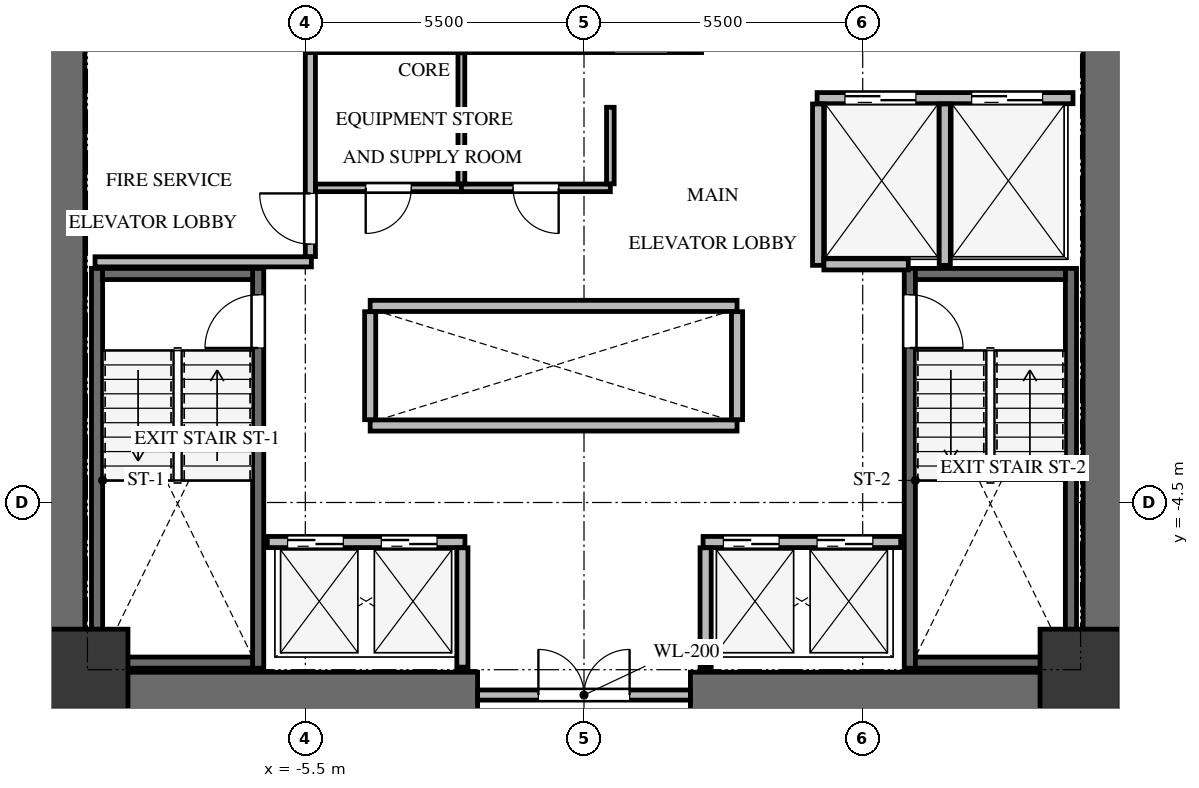
"""IFC4 building model, lengths in metres.
Left out: names, types, materials, properties, quantities, classifications, styles, units other than length and angle.
Written with IfcOpenShell. Run it as: python <this file> out.ifc"""

import sys

from ifc_helpers import new_model, si_unit, direction, frame, frame_2d, origin, origin_2d, place, context, subcontext, project, spatial, rectangle, extrude, source, transform, mapped, element, fill, save


model = new_model("IFC4")
c1 = context("Model", 3, precision=1e-05, world=origin(), true_north=direction((0.0, 1.0)))
c2 = subcontext(c1, "Body", "Model", "MODEL_VIEW")
j1 = project(units=[si_unit("LENGTHUNIT", "METRE"), si_unit("PLANEANGLEUNIT", "RADIAN")], contexts=[c1])
p1 = place(None, origin())
s1 = spatial("IfcSite", under=j1, at=p1, CompositionType="ELEMENT")
p2 = place(p1, origin())
s2 = spatial("IfcBuilding", under=s1, at=p2, CompositionType="ELEMENT")
p3 = place(p2, frame((0.0, 0.0, 62.1)))
s3 = spatial("IfcBuildingStorey", under=s2, at=p3, CompositionType="ELEMENT", Elevation=62.1)
for number, where, z_axis, x_axis in (
    (1, (-10.3, -8.75, 0.0), (0.0, 0.0, 1.0), (0.0, 1.0, 0.0)),
    (2, (10.3, -8.75, 0.0), (0.0, 0.0, 1.0), (0.0, 1.0, 0.0)),
):
    element("IfcWall", number, at=place(p3, frame(where, z_axis=z_axis, x_axis=x_axis)), inside=s3, PredefinedType="SHEAR", context=c2, shape_type="SweptSolid", body=[
        extrude(rectangle(XDim=17.5, YDim=0.9, at=frame_2d((8.75, 0.0))), origin(), (0.0, 0.0, 1.0), 3.3),
    ])
for number, where, z_axis, x_axis in (
    (3, (-9.85, -8.3, 0.0), (0.0, 0.0, 1.0), (1.0, 0.0, 0.0)),
    (4, (2.1, -8.3, 0.0), (0.0, 0.0, 1.0), (1.0, 0.0, 0.0)),
):
    element("IfcWall", number, at=place(p3, frame(where, z_axis=z_axis, x_axis=x_axis)), inside=s3, PredefinedType="SHEAR", context=c2, shape_type="SweptSolid", body=[
        extrude(rectangle(XDim=7.75, YDim=0.9, at=frame_2d((3.875, 0.0))), origin(), (0.0, 0.0, 1.0), 3.3),
    ])
p4 = place(p3, frame((-6.43, -7.77, -0.24), z_axis=(0.0, 0.0, 1.0), x_axis=(0.0, 1.0, 0.0)))
e5 = element("IfcWall", 5, at=p4, inside=s3, PredefinedType="SHEAR", context=c2, shape_type="SweptSolid", body=[
    extrude(rectangle(XDim=7.89, YDim=0.22, at=frame_2d((3.945, 0.0))), origin(), (0.0, 0.0, 1.0), 3.3),
])
p5 = place(p4, frame((6.32, 0.0, 0.0)))
e6 = element("IfcOpeningElement", 6, at=p5, cuts=e5, PredefinedType="OPENING", context=c2, shape_type="SweptSolid", body=[
    extrude(rectangle(XDim=1.05, YDim=2.15, at=frame_2d((0.525, 1.075))), frame((0.0, 0.12, 0.0), z_axis=(0.0, -1.0, 0.0), x_axis=(1.0, 0.0, 0.0)), (0.0, 0.0, 1.0), 0.24),
])
p6 = place(p3, frame((-9.61, 0.12, -0.24), z_axis=(0.0, 0.0, 1.0), x_axis=(0.0, -1.0, 0.0)))
e7 = element("IfcWall", 7, at=p6, inside=s3, PredefinedType="SHEAR", context=c2, shape_type="SweptSolid", body=[
    extrude(rectangle(XDim=7.89, YDim=0.22, at=frame_2d((3.945, 0.0))), origin(), (0.0, 0.0, 1.0), 3.3),
])
for number, where, z_axis, x_axis in (
    (8, (-9.5, -7.66, -0.24), (0.0, 0.0, 1.0), (1.0, 0.0, 0.0)),
    (9, (-6.54, 0.01, -0.24), (0.0, 0.0, 1.0), (-1.0, 0.0, 0.0)),
):
    element("IfcWall", number, at=place(p3, frame(where, z_axis=z_axis, x_axis=x_axis)), inside=s3, PredefinedType="SHEAR", context=c2, shape_type="SweptSolid", body=[
        extrude(rectangle(XDim=2.96, YDim=0.22, at=frame_2d((1.48, 0.0))), origin(), (0.0, 0.0, 1.0), 3.3),
    ])
p7 = place(p3, frame((9.61, -7.77, -0.24), z_axis=(0.0, 0.0, 1.0), x_axis=(0.0, 1.0, 0.0)))
e10 = element("IfcWall", 10, at=p7, inside=s3, PredefinedType="SHEAR", context=c2, shape_type="SweptSolid", body=[
    extrude(rectangle(XDim=7.89, YDim=0.22, at=frame_2d((3.945, 0.0))), origin(), (0.0, 0.0, 1.0), 3.3),
])
p8 = place(p3, frame((6.43, 0.12, -0.24), z_axis=(0.0, 0.0, 1.0), x_axis=(0.0, -1.0, 0.0)))
e11 = element("IfcWall", 11, at=p8, inside=s3, PredefinedType="SHEAR", context=c2, shape_type="SweptSolid", body=[
    extrude(rectangle(XDim=7.89, YDim=0.22, at=frame_2d((3.945, 0.0))), origin(), (0.0, 0.0, 1.0), 3.3),
])
p9 = place(p8, frame((0.52, 0.0, 0.0)))
e12 = element("IfcOpeningElement", 12, at=p9, cuts=e11, PredefinedType="OPENING", context=c2, shape_type="SweptSolid", body=[
    extrude(rectangle(XDim=1.05, YDim=2.15, at=frame_2d((0.525, 1.075))), frame((0.0, 0.12, 0.0), z_axis=(0.0, -1.0, 0.0), x_axis=(1.0, 0.0, 0.0)), (0.0, 0.0, 1.0), 0.24),
])
for number, where, z_axis, x_axis in (
    (13, (6.54, -7.66, -0.24), (0.0, 0.0, 1.0), (1.0, 0.0, 0.0)),
    (14, (9.5, 0.01, -0.24), (0.0, 0.0, 1.0), (-1.0, 0.0, 0.0)),
):
    element("IfcWall", number, at=place(p3, frame(where, z_axis=z_axis, x_axis=x_axis)), inside=s3, PredefinedType="SHEAR", context=c2, shape_type="SweptSolid", body=[
        extrude(rectangle(XDim=2.96, YDim=0.22, at=frame_2d((1.48, 0.0))), origin(), (0.0, 0.0, 1.0), 3.3),
    ])
for number, where, z_axis, x_axis in (
    (15, (2.21, 4.38, -0.24), (0.0, 0.0, 1.0), (0.0, 1.0, 0.0)),
    (16, (-5.36, 7.78, -0.24), (0.0, 0.0, 1.0), (0.0, -1.0, 0.0)),
):
    element("IfcWall", number, at=place(p3, frame(where, z_axis=z_axis, x_axis=x_axis)), inside=s3, PredefinedType="SHEAR", context=c2, shape_type="SweptSolid", body=[
        extrude(rectangle(XDim=3.4, YDim=0.22, at=frame_2d((1.7, 0.0))), origin(), (0.0, 0.0, 1.0), 3.3),
    ])
p10 = place(p3, frame((-5.25, 4.49, -0.24), z_axis=(0.0, 0.0, 1.0), x_axis=(1.0, 0.0, 0.0)))
e17 = element("IfcWall", 17, at=p10, inside=s3, PredefinedType="SHEAR", context=c2, shape_type="SweptSolid", body=[
    extrude(rectangle(XDim=7.35, YDim=0.22, at=frame_2d((3.675, 0.0))), origin(), (0.0, 0.0, 1.0), 3.3),
])
p11 = place(p10, frame((5.85, 0.0, 0.0)))
e18 = element("IfcOpeningElement", 18, at=p11, cuts=e17, PredefinedType="OPENING", context=c2, shape_type="SweptSolid", body=[
    extrude(rectangle(XDim=1.05, YDim=2.15, at=frame_2d((0.525, 1.075))), frame((0.0, 0.12, 0.0), z_axis=(0.0, -1.0, 0.0), x_axis=(1.0, 0.0, 0.0)), (0.0, 0.0, 1.0), 0.24),
])
m1 = source(origin(), c2, "Body", "SweptSolid", [
    extrude(rectangle(XDim=1.6, YDim=1.6, at=origin_2d()), origin(), (0.0, 0.0, 1.0), 3.3),
])
for number, where, z_axis, x_axis in (
    (19, (-9.8, -7.8, -0.24), (0.0, 0.0, 1.0), (1.0, 0.0, 0.0)),
    (20, (9.8, -7.8, -0.24), (0.0, 0.0, 1.0), (1.0, 0.0, 0.0)),
):
    element("IfcColumn", number, at=place(p3, frame(where, z_axis=z_axis, x_axis=x_axis)), inside=s3, PredefinedType="COLUMN", context=c2, shape_type="MappedRepresentation", body=[
        mapped(m1, transform((0.0, 0.0, 0.0), x_axis=(1.0, 0.0, 0.0), y_axis=(0.0, 1.0, 0.0), z_axis=(0.0, 0.0, 1.0), scale=1.0)),
    ])
p12 = place(p3, frame((-2.1, -8.3, 0.0), z_axis=(0.0, 0.0, 1.0), x_axis=(1.0, 0.0, 0.0)))
e21 = element("IfcWall", 21, at=p12, inside=s3, PredefinedType="SOLIDWALL", context=c2, shape_type="SweptSolid", body=[
    extrude(rectangle(XDim=4.2, YDim=0.2, at=frame_2d((2.1, 0.0))), origin(), (0.0, 0.0, 1.0), 3.045),
])
p13 = place(p12, frame((1.2, 0.0, 0.0)))
e22 = element("IfcOpeningElement", 22, at=p13, cuts=e21, PredefinedType="OPENING", context=c2, shape_type="SweptSolid", body=[
    extrude(rectangle(XDim=1.8, YDim=2.15, at=frame_2d((0.9, 1.075))), frame((0.0, 0.11, 0.0), z_axis=(0.0, -1.0, 0.0), x_axis=(1.0, 0.0, 0.0)), (0.0, 0.0, 1.0), 0.22),
])
p14 = place(p3, frame((-9.65, 0.25, 0.0), z_axis=(0.0, 0.0, 1.0), x_axis=(1.0, 0.0, 0.0)))
e23 = element("IfcWall", 23, at=p14, inside=s3, PredefinedType="SOLIDWALL", context=c2, shape_type="SweptSolid", body=[
    extrude(rectangle(XDim=4.27, YDim=0.2, at=frame_2d((2.135, 0.0))), origin(), (0.0, 0.0, 1.0), 3.045),
])
p15 = place(p3, frame((-5.4, 0.354, 0.0), z_axis=(0.0, 0.0, 1.0), x_axis=(0.0, 1.0, 0.0)))
e24 = element("IfcWall", 24, at=p15, inside=s3, PredefinedType="SOLIDWALL", context=c2, shape_type="SweptSolid", body=[
    extrude(rectangle(XDim=4.026, YDim=0.2, at=frame_2d((2.013, 0.0))), origin(), (0.0, 0.0, 1.0), 3.045),
])
p16 = place(p15, frame((0.246, 0.0, 0.0)))
e25 = element("IfcOpeningElement", 25, at=p16, cuts=e24, PredefinedType="OPENING", context=c2, shape_type="SweptSolid", body=[
    extrude(rectangle(XDim=1.0, YDim=2.15, at=frame_2d((0.5, 1.075))), frame((0.0, 0.11, 0.0), z_axis=(0.0, -1.0, 0.0), x_axis=(1.0, 0.0, 0.0)), (0.0, 0.0, 1.0), 0.22),
])
p17 = place(p3, frame((4.6, 3.48, 0.0), z_axis=(0.0, 0.0, 1.0), x_axis=(1.0, 0.0, 0.0)))
e26 = element("IfcWall", 26, at=p17, inside=s3, PredefinedType="SOLIDWALL", context=c2, shape_type="SweptSolid", body=[
    extrude(rectangle(XDim=5.05, YDim=0.22, at=frame_2d((2.525, 0.0))), origin(), (0.0, 0.0, 1.0), 3.045),
])
p18 = place(p17, frame((0.55, 0.0, 0.0)))
e27 = element("IfcOpeningElement", 27, at=p18, cuts=e26, PredefinedType="OPENING", context=c2, shape_type="SweptSolid", body=[
    extrude(rectangle(XDim=1.4, YDim=2.15, at=frame_2d((0.7, 1.075))), frame((0.0, 0.12, 0.0), z_axis=(0.0, -1.0, 0.0), x_axis=(1.0, 0.0, 0.0)), (0.0, 0.0, 1.0), 0.24),
])
p19 = place(p17, frame((3.05, 0.0, 0.0)))
e28 = element("IfcOpeningElement", 28, at=p19, cuts=e26, PredefinedType="OPENING", context=c2, shape_type="SweptSolid", body=[
    extrude(rectangle(XDim=1.4, YDim=2.15, at=frame_2d((0.7, 1.075))), frame((0.0, 0.12, 0.0), z_axis=(0.0, -1.0, 0.0), x_axis=(1.0, 0.0, 0.0)), (0.0, 0.0, 1.0), 0.24),
])
for number, where, z_axis, x_axis in (
    (29, (4.62, 0.18, 0.0), (0.0, 0.0, 1.0), (0.0, 1.0, 0.0)),
    (30, (7.12, 0.18, 0.0), (0.0, 0.0, 1.0), (0.0, 1.0, 0.0)),
):
    element("IfcWall", number, at=place(p3, frame(where, z_axis=z_axis, x_axis=x_axis)), inside=s3, PredefinedType="SOLIDWALL", context=c2, shape_type="SweptSolid", body=[
        extrude(rectangle(XDim=3.186, YDim=0.22, at=frame_2d((1.593, 0.0))), origin(), (0.0, 0.0, 1.0), 3.045),
    ])
p20 = place(p3, frame((4.734, 0.2, 0.0), z_axis=(0.0, 0.0, 1.0), x_axis=(1.0, 0.0, 0.0)))
e31 = element("IfcWall", 31, at=p20, inside=s3, PredefinedType="SOLIDWALL", context=c2, shape_type="SweptSolid", body=[
    extrude(rectangle(XDim=1.666, YDim=0.22, at=frame_2d((0.833, 0.0))), origin(), (0.0, 0.0, 1.0), 3.045),
])
p21 = place(p3, frame((-6.25, -5.28, 0.0), z_axis=(0.0, 0.0, 1.0), x_axis=(1.0, 0.0, 0.0)))
e32 = element("IfcWall", 32, at=p21, inside=s3, PredefinedType="SOLIDWALL", context=c2, shape_type="SweptSolid", body=[
    extrude(rectangle(XDim=3.9, YDim=0.22, at=frame_2d((1.95, 0.0))), origin(), (0.0, 0.0, 1.0), 3.045),
])
p22 = place(p21, frame((0.4, 0.0, 0.0)))
e33 = element("IfcOpeningElement", 33, at=p22, cuts=e32, PredefinedType="OPENING", context=c2, shape_type="SweptSolid", body=[
    extrude(rectangle(XDim=1.1, YDim=2.15, at=frame_2d((0.55, 1.075))), frame((0.0, 0.12, 0.0), z_axis=(0.0, -1.0, 0.0), x_axis=(1.0, 0.0, 0.0)), (0.0, 0.0, 1.0), 0.24),
])
p23 = place(p21, frame((2.25, 0.0, 0.0)))
e34 = element("IfcOpeningElement", 34, at=p23, cuts=e32, PredefinedType="OPENING", context=c2, shape_type="SweptSolid", body=[
    extrude(rectangle(XDim=1.1, YDim=2.15, at=frame_2d((0.55, 1.075))), frame((0.0, 0.12, 0.0), z_axis=(0.0, -1.0, 0.0), x_axis=(1.0, 0.0, 0.0)), (0.0, 0.0, 1.0), 0.24),
])
p24 = place(p3, frame((2.35, -5.28, 0.0), z_axis=(0.0, 0.0, 1.0), x_axis=(1.0, 0.0, 0.0)))
e35 = element("IfcWall", 35, at=p24, inside=s3, PredefinedType="SOLIDWALL", context=c2, shape_type="SweptSolid", body=[
    extrude(rectangle(XDim=3.9, YDim=0.22, at=frame_2d((1.95, 0.0))), origin(), (0.0, 0.0, 1.0), 3.045),
])
p25 = place(p24, frame((0.4, 0.0, 0.0)))
e36 = element("IfcOpeningElement", 36, at=p25, cuts=e35, PredefinedType="OPENING", context=c2, shape_type="SweptSolid", body=[
    extrude(rectangle(XDim=1.1, YDim=2.15, at=frame_2d((0.55, 1.075))), frame((0.0, 0.12, 0.0), z_axis=(0.0, -1.0, 0.0), x_axis=(1.0, 0.0, 0.0)), (0.0, 0.0, 1.0), 0.24),
])
p26 = place(p24, frame((2.25, 0.0, 0.0)))
e37 = element("IfcOpeningElement", 37, at=p26, cuts=e35, PredefinedType="OPENING", context=c2, shape_type="SweptSolid", body=[
    extrude(rectangle(XDim=1.1, YDim=2.15, at=frame_2d((0.55, 1.075))), frame((0.0, 0.12, 0.0), z_axis=(0.0, -1.0, 0.0), x_axis=(1.0, 0.0, 0.0)), (0.0, 0.0, 1.0), 0.24),
])
for number, where, z_axis, x_axis in (
    (38, (-2.4, -7.75, 0.0), (0.0, 0.0, 1.0), (0.0, 1.0, 0.0)),
    (39, (2.4, -7.75, 0.0), (0.0, 0.0, 1.0), (0.0, 1.0, 0.0)),
):
    element("IfcWall", number, at=place(p3, frame(where, z_axis=z_axis, x_axis=x_axis)), inside=s3, PredefinedType="SOLIDWALL", context=c2, shape_type="SweptSolid", body=[
        extrude(rectangle(XDim=2.356, YDim=0.22, at=frame_2d((1.178, 0.0))), origin(), (0.0, 0.0, 1.0), 3.045),
    ])
for number, where, z_axis, x_axis in (
    (40, (-4.22, -2.98, 0.0), (0.0, 0.0, 1.0), (1.0, 0.0, 0.0)),
    (41, (-4.22, -0.62, 0.0), (0.0, 0.0, 1.0), (1.0, 0.0, 0.0)),
):
    element("IfcWall", number, at=place(p3, frame(where, z_axis=z_axis, x_axis=x_axis)), inside=s3, PredefinedType="SOLIDWALL", context=c2, shape_type="SweptSolid", body=[
        extrude(rectangle(XDim=7.24, YDim=0.22, at=frame_2d((3.62, 0.0))), origin(), (0.0, 0.0, 1.0), 3.045),
    ])
for number, where, z_axis, x_axis in (
    (42, (-4.22, -2.866, 0.0), (0.0, 0.0, 1.0), (0.0, 1.0, 0.0)),
    (43, (3.02, -2.866, 0.0), (0.0, 0.0, 1.0), (0.0, 1.0, 0.0)),
):
    element("IfcWall", number, at=place(p3, frame(where, z_axis=z_axis, x_axis=x_axis)), inside=s3, PredefinedType="SOLIDWALL", context=c2, shape_type="SweptSolid", body=[
        extrude(rectangle(XDim=2.132, YDim=0.22, at=frame_2d((1.066, 0.0))), origin(), (0.0, 0.0, 1.0), 3.045),
    ])
p27 = place(p3, frame((-2.42, 1.71, 0.0), z_axis=(0.0, 0.0, 1.0), x_axis=(-1.0, 0.0, 0.0)))
e44 = element("IfcWall", 44, at=p27, inside=s3, PredefinedType="PARTITIONING", context=c2, shape_type="SweptSolid", body=[
    extrude(rectangle(XDim=2.876, YDim=0.15, at=frame_2d((1.438, 0.0))), origin(), (0.0, 0.0, 1.0), 3.045),
])
p28 = place(p27, frame((0.988, 0.0, 0.0)))
e45 = element("IfcOpeningElement", 45, at=p28, cuts=e44, PredefinedType="OPENING", context=c2, shape_type="SweptSolid", body=[
    extrude(rectangle(XDim=0.9, YDim=2.05, at=frame_2d((0.45, 1.025))), frame((0.0, 0.085, 0.0), z_axis=(0.0, -1.0, 0.0), x_axis=(1.0, 0.0, 0.0)), (0.0, 0.0, 1.0), 0.17),
])
p29 = place(p3, frame((0.52, 1.71, 0.0), z_axis=(0.0, 0.0, 1.0), x_axis=(-1.0, 0.0, 0.0)))
e46 = element("IfcWall", 46, at=p29, inside=s3, PredefinedType="PARTITIONING", context=c2, shape_type="SweptSolid", body=[
    extrude(rectangle(XDim=2.94, YDim=0.15, at=frame_2d((1.47, 0.0))), origin(), (0.0, 0.0, 1.0), 3.045),
])
p30 = place(p29, frame((1.02, 0.0, 0.0)))
e47 = element("IfcOpeningElement", 47, at=p30, cuts=e46, PredefinedType="OPENING", context=c2, shape_type="SweptSolid", body=[
    extrude(rectangle(XDim=0.9, YDim=2.05, at=frame_2d((0.45, 1.025))), frame((0.0, 0.085, 0.0), z_axis=(0.0, -1.0, 0.0), x_axis=(1.0, 0.0, 0.0)), (0.0, 0.0, 1.0), 0.17),
])
p31 = place(p3, frame((0.52, 3.3, 0.0), z_axis=(0.0, 0.0, 1.0), x_axis=(0.0, -1.0, 0.0)))
e48 = element("IfcWall", 48, at=p31, inside=s3, PredefinedType="PARTITIONING", context=c2, shape_type="SweptSolid", body=[
    extrude(rectangle(XDim=1.511, YDim=0.15, at=frame_2d((0.755, 0.0))), origin(), (0.0, 0.0, 1.0), 3.045),
])
p32 = place(p3, frame((-2.42, 4.375, 0.0), z_axis=(0.0, 0.0, 1.0), x_axis=(0.0, -1.0, 0.0)))
e49 = element("IfcWall", 49, at=p32, inside=s3, PredefinedType="PARTITIONING", context=c2, shape_type="SweptSolid", body=[
    extrude(rectangle(XDim=2.586, YDim=0.135, at=frame_2d((1.293, 0.0))), origin(), (0.0, 0.0, 1.0), 3.045),
])
m2 = source(origin(), c2, "Body", "SweptSolid", [
    extrude(rectangle(XDim=1.05, YDim=2.15, at=frame_2d((0.525, 1.075))), frame((0.0, 0.025, 0.0), z_axis=(0.0, -1.0, 0.0), x_axis=(1.0, 0.0, 0.0)), (0.0, 0.0, 1.0), 0.05),
])
p33 = place(p5, origin())
e50 = element("IfcDoor", 50, at=p33, inside=s3, OperationType="SINGLE_SWING_LEFT", PredefinedType="DOOR", context=c2, shape_type="MappedRepresentation", body=[
    mapped(m2, transform((0.0, 0.0, 0.0), x_axis=(1.0, 0.0, 0.0), y_axis=(0.0, 1.0, 0.0), z_axis=(0.0, 0.0, 1.0), scale=1.0)),
])
fill(e6, e50)
m3 = source(origin(), c2, "Body", "SweptSolid", [
    extrude(rectangle(XDim=1.05, YDim=2.15, at=frame_2d((0.525, 1.075))), frame((0.0, 0.025, 0.0), z_axis=(0.0, -1.0, 0.0), x_axis=(1.0, 0.0, 0.0)), (0.0, 0.0, 1.0), 0.05),
])
p34 = place(p9, origin())
e51 = element("IfcDoor", 51, at=p34, inside=s3, OperationType="SINGLE_SWING_RIGHT", PredefinedType="DOOR", context=c2, shape_type="MappedRepresentation", body=[
    mapped(m3, transform((0.0, 0.0, 0.0), x_axis=(1.0, 0.0, 0.0), y_axis=(0.0, 1.0, 0.0), z_axis=(0.0, 0.0, 1.0), scale=1.0)),
])
fill(e12, e51)
m4 = source(origin(), c2, "Body", "SweptSolid", [
    extrude(rectangle(XDim=1.8, YDim=2.15, at=frame_2d((0.9, 1.075))), frame((0.0, 0.025, 0.0), z_axis=(0.0, -1.0, 0.0), x_axis=(1.0, 0.0, 0.0)), (0.0, 0.0, 1.0), 0.05),
])
p35 = place(p13, origin())
e52 = element("IfcDoor", 52, at=p35, inside=s3, OperationType="DOUBLE_DOOR_SINGLE_SWING", PredefinedType="DOOR", context=c2, shape_type="MappedRepresentation", body=[
    mapped(m4, transform((0.0, 0.0, 0.0), x_axis=(1.0, 0.0, 0.0), y_axis=(0.0, 1.0, 0.0), z_axis=(0.0, 0.0, 1.0), scale=1.0)),
])
fill(e22, e52)
m5 = source(origin(), c2, "Body", "SweptSolid", [
    extrude(rectangle(XDim=1.0, YDim=2.15, at=frame_2d((0.5, 1.075))), frame((0.0, 0.025, 0.0), z_axis=(0.0, -1.0, 0.0), x_axis=(1.0, 0.0, 0.0)), (0.0, 0.0, 1.0), 0.05),
])
p36 = place(p16, origin())
e53 = element("IfcDoor", 53, at=p36, inside=s3, OperationType="SINGLE_SWING_RIGHT", PredefinedType="DOOR", context=c2, shape_type="MappedRepresentation", body=[
    mapped(m5, transform((0.0, 0.0, 0.0), x_axis=(1.0, 0.0, 0.0), y_axis=(0.0, 1.0, 0.0), z_axis=(0.0, 0.0, 1.0), scale=1.0)),
])
fill(e25, e53)
m6 = source(origin(), c2, "Body", "SweptSolid", [
    extrude(rectangle(XDim=1.4, YDim=2.15, at=frame_2d((0.7, 1.075))), frame((0.0, 0.025, 0.0), z_axis=(0.0, -1.0, 0.0), x_axis=(1.0, 0.0, 0.0)), (0.0, 0.0, 1.0), 0.05),
])
p37 = place(p18, origin())
e54 = element("IfcDoor", 54, at=p37, inside=s3, OperationType="DOUBLE_DOOR_SLIDING", PredefinedType="DOOR", context=c2, shape_type="MappedRepresentation", body=[
    mapped(m6, transform((0.0, 0.0, 0.0), x_axis=(1.0, 0.0, 0.0), y_axis=(0.0, 1.0, 0.0), z_axis=(0.0, 0.0, 1.0), scale=1.0)),
])
fill(e27, e54)
p38 = place(p19, origin())
e55 = element("IfcDoor", 55, at=p38, inside=s3, OperationType="DOUBLE_DOOR_SLIDING", PredefinedType="DOOR", context=c2, shape_type="MappedRepresentation", body=[
    mapped(m6, transform((0.0, 0.0, 0.0), x_axis=(1.0, 0.0, 0.0), y_axis=(0.0, 1.0, 0.0), z_axis=(0.0, 0.0, 1.0), scale=1.0)),
])
fill(e28, e55)
m7 = source(origin(), c2, "Body", "SweptSolid", [
    extrude(rectangle(XDim=1.1, YDim=2.15, at=frame_2d((0.55, 1.075))), frame((0.0, 0.025, 0.0), z_axis=(0.0, -1.0, 0.0), x_axis=(1.0, 0.0, 0.0)), (0.0, 0.0, 1.0), 0.05),
])
p39 = place(p22, origin())
e56 = element("IfcDoor", 56, at=p39, inside=s3, OperationType="DOUBLE_DOOR_SLIDING", PredefinedType="DOOR", context=c2, shape_type="MappedRepresentation", body=[
    mapped(m7, transform((0.0, 0.0, 0.0), x_axis=(1.0, 0.0, 0.0), y_axis=(0.0, 1.0, 0.0), z_axis=(0.0, 0.0, 1.0), scale=1.0)),
])
fill(e33, e56)
p40 = place(p23, origin())
e57 = element("IfcDoor", 57, at=p40, inside=s3, OperationType="DOUBLE_DOOR_SLIDING", PredefinedType="DOOR", context=c2, shape_type="MappedRepresentation", body=[
    mapped(m7, transform((0.0, 0.0, 0.0), x_axis=(1.0, 0.0, 0.0), y_axis=(0.0, 1.0, 0.0), z_axis=(0.0, 0.0, 1.0), scale=1.0)),
])
fill(e34, e57)
p41 = place(p25, origin())
e58 = element("IfcDoor", 58, at=p41, inside=s3, OperationType="DOUBLE_DOOR_SLIDING", PredefinedType="DOOR", context=c2, shape_type="MappedRepresentation", body=[
    mapped(m7, transform((0.0, 0.0, 0.0), x_axis=(1.0, 0.0, 0.0), y_axis=(0.0, 1.0, 0.0), z_axis=(0.0, 0.0, 1.0), scale=1.0)),
])
fill(e36, e58)
p42 = place(p26, origin())
e59 = element("IfcDoor", 59, at=p42, inside=s3, OperationType="DOUBLE_DOOR_SLIDING", PredefinedType="DOOR", context=c2, shape_type="MappedRepresentation", body=[
    mapped(m7, transform((0.0, 0.0, 0.0), x_axis=(1.0, 0.0, 0.0), y_axis=(0.0, 1.0, 0.0), z_axis=(0.0, 0.0, 1.0), scale=1.0)),
])
fill(e37, e59)
m8 = source(origin(), c2, "Body", "SweptSolid", [
    extrude(rectangle(XDim=0.9, YDim=2.05, at=frame_2d((0.45, 1.025))), frame((0.0, 0.025, 0.0), z_axis=(0.0, -1.0, 0.0), x_axis=(1.0, 0.0, 0.0)), (0.0, 0.0, 1.0), 0.05),
])
p43 = place(p28, origin())
e60 = element("IfcDoor", 60, at=p43, inside=s3, OperationType="SINGLE_SWING_RIGHT", PredefinedType="DOOR", context=c2, shape_type="MappedRepresentation", body=[
    mapped(m8, transform((0.0, 0.0, 0.0), x_axis=(1.0, 0.0, 0.0), y_axis=(0.0, 1.0, 0.0), z_axis=(0.0, 0.0, 1.0), scale=1.0)),
])
fill(e45, e60)
m9 = source(origin(), c2, "Body", "SweptSolid", [
    extrude(rectangle(XDim=0.9, YDim=2.05, at=frame_2d((0.45, 1.025))), frame((0.0, 0.025, 0.0), z_axis=(0.0, -1.0, 0.0), x_axis=(1.0, 0.0, 0.0)), (0.0, 0.0, 1.0), 0.05),
])
p44 = place(p30, origin())
e61 = element("IfcDoor", 61, at=p44, inside=s3, OperationType="SINGLE_SWING_LEFT", PredefinedType="DOOR", context=c2, shape_type="MappedRepresentation", body=[
    mapped(m9, transform((0.0, 0.0, 0.0), x_axis=(1.0, 0.0, 0.0), y_axis=(0.0, 1.0, 0.0), z_axis=(0.0, 0.0, 1.0), scale=1.0)),
])
fill(e47, e61)
save(model, sys.argv[1])
